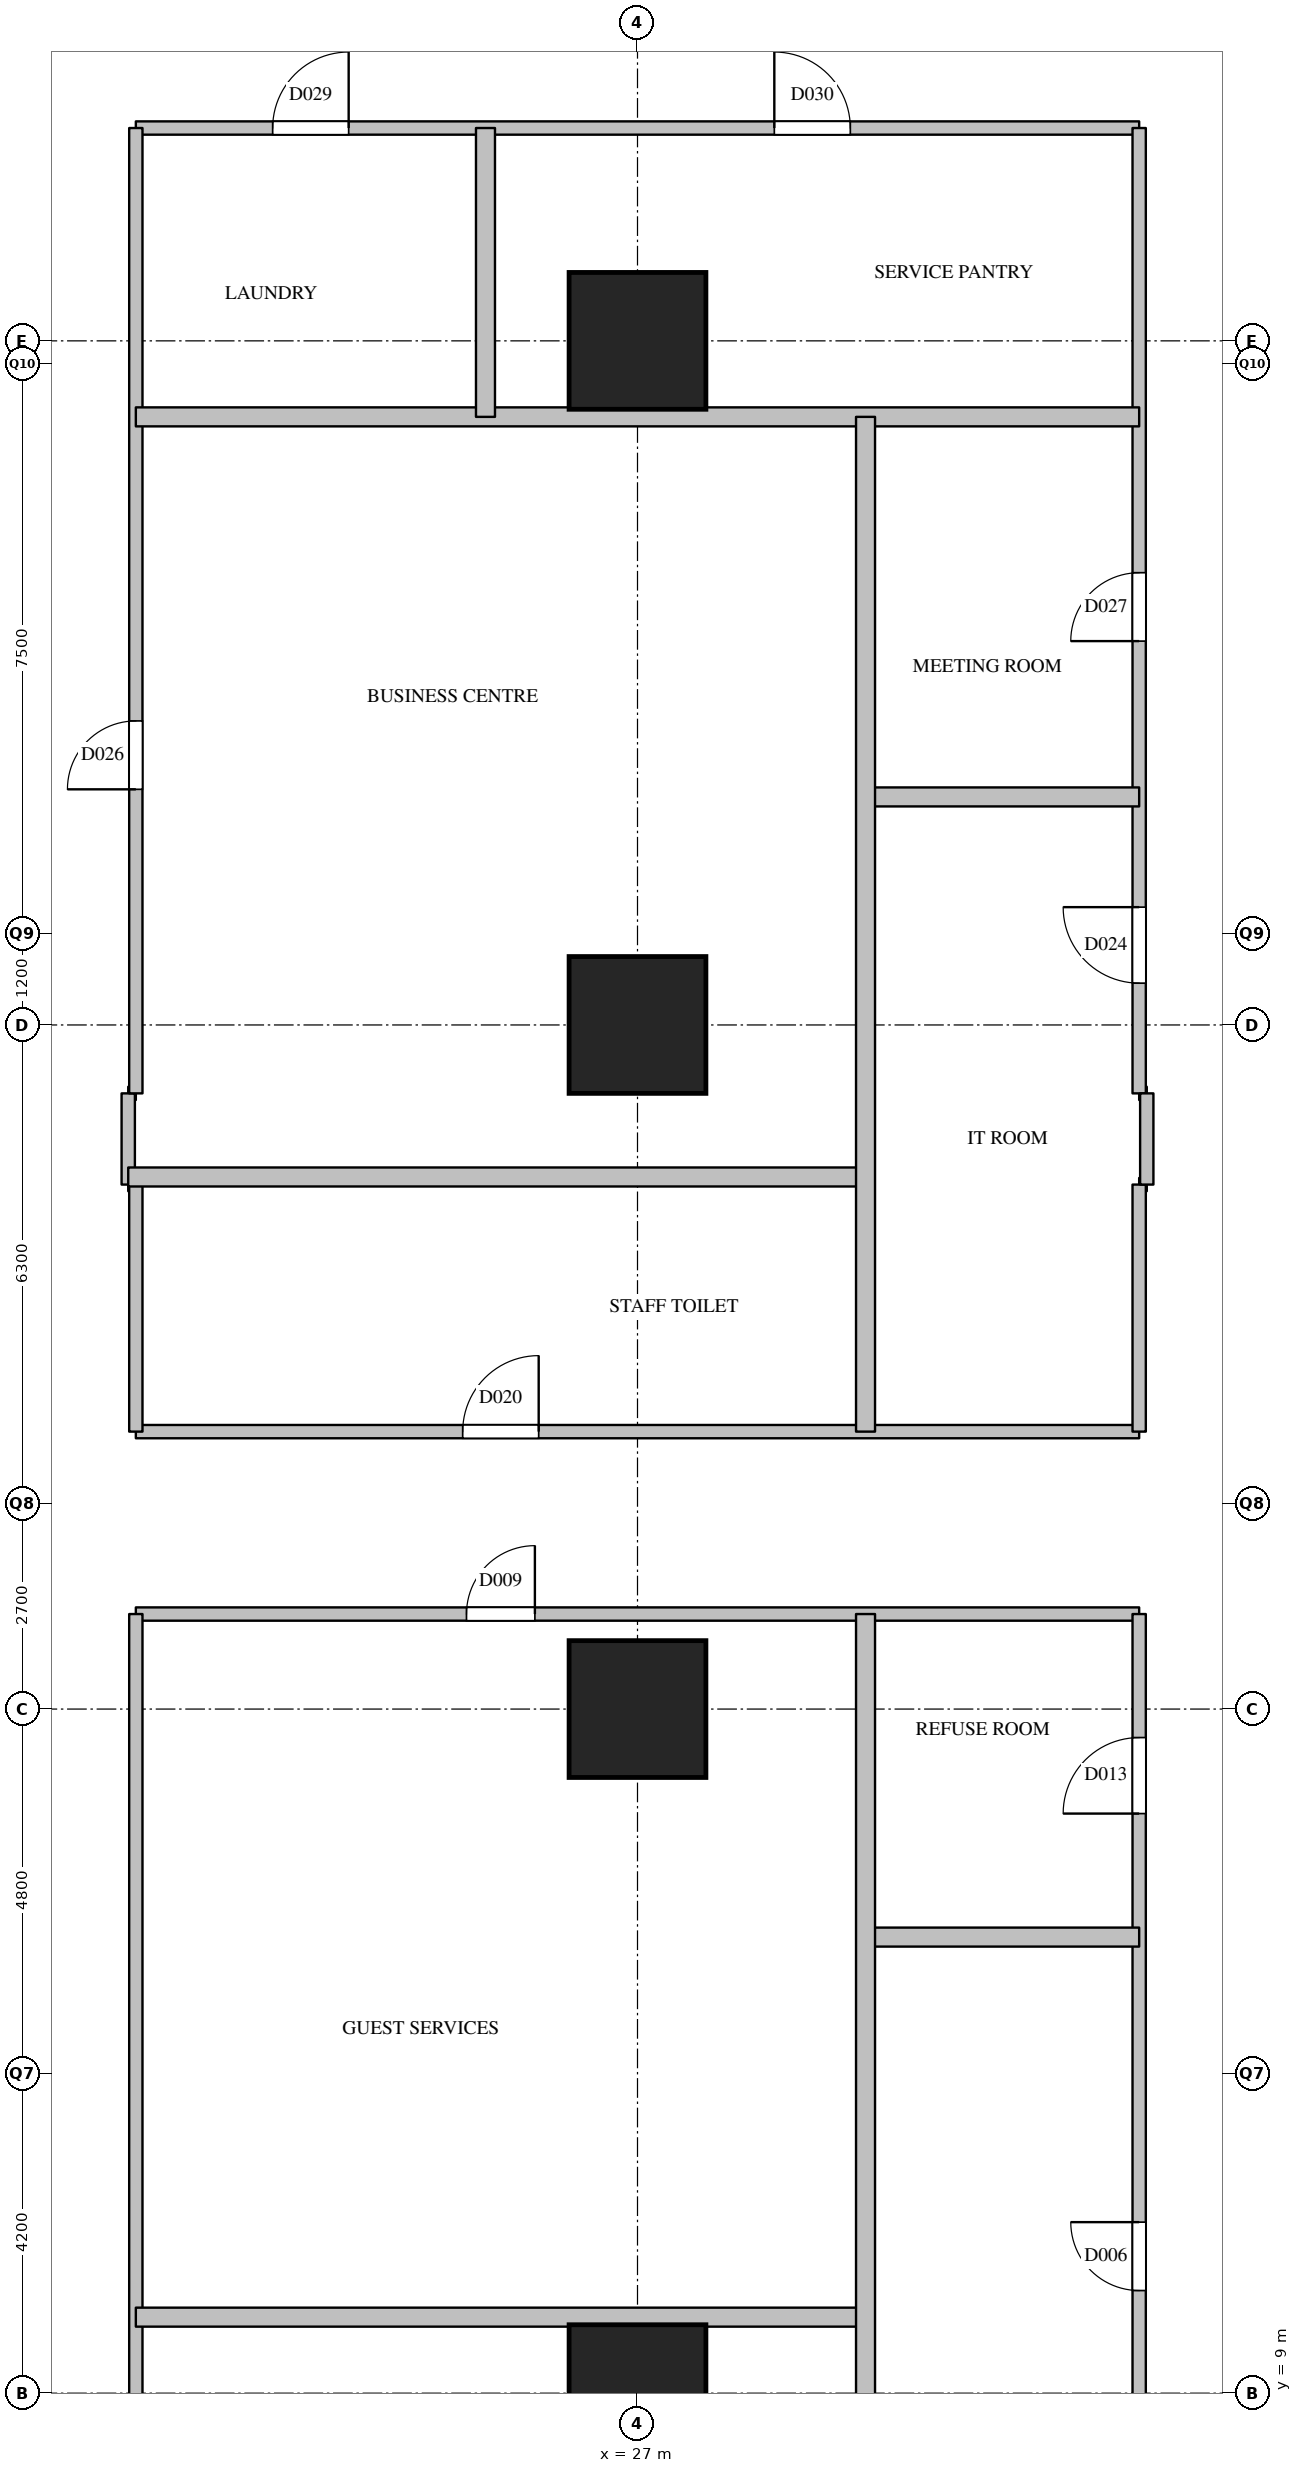
"""IFC4 building model, lengths in metres.
Left out: names, types, materials, properties, quantities, classifications, styles, units other than length and angle.
Written with IfcOpenShell. Run it as: python <this file> out.ifc"""

import sys

from ifc_helpers import new_model, si_unit, direction, frame, frame_2d, origin, origin_2d, place, context, subcontext, project, spatial, rectangle, extrude, element, fill, save


model = new_model("IFC4")
c1 = context("Model", 3, precision=1e-05, world=origin(), true_north=direction((0.0, 1.0)))
c2 = subcontext(c1, "Body", "Model", "MODEL_VIEW")
j1 = project(units=[si_unit("LENGTHUNIT", "METRE"), si_unit("PLANEANGLEUNIT", "RADIAN")], contexts=[c1])
p1 = place(None, origin())
s1 = spatial("IfcSite", under=j1, at=p1, CompositionType="ELEMENT")
p2 = place(p1, origin())
s2 = spatial("IfcBuilding", under=s1, at=p2, CompositionType="ELEMENT")
p3 = place(p2, frame((0.0, 0.0, 50.0)))
s3 = spatial("IfcBuildingStorey", under=s2, at=p3, CompositionType="ELEMENT", Elevation=50.0)
for number, where, z_axis, x_axis in (
    (1, (27.0, 9.0, 0.0), (0.0, 0.0, 1.0), (1.0, 0.0, 0.0)),
    (2, (27.0, 18.0, 0.0), (0.0, 0.0, 1.0), (1.0, 0.0, 0.0)),
    (3, (27.0, 27.0, 0.0), (0.0, 0.0, 1.0), (1.0, 0.0, 0.0)),
    (4, (27.0, 36.0, 0.0), (0.0, 0.0, 1.0), (1.0, 0.0, 0.0)),
):
    element("IfcColumn", number, at=place(p3, frame(where, z_axis=z_axis, x_axis=x_axis)), inside=s3, PredefinedType="COLUMN", context=c2, shape_type="SweptSolid", body=[
        extrude(rectangle(XDim=1.8, YDim=1.8, at=origin_2d()), origin(), (0.0, 0.0, 1.0), 3.8),
    ])
p4 = place(p3, frame((20.4, 19.25, 0.0), z_axis=(0.0, 0.0, 1.0), x_axis=(1.0, 0.0, 0.0)))
e5 = element("IfcWall", 5, at=p4, inside=s3, PredefinedType="PARTITIONING", context=c2, shape_type="SweptSolid", body=[
    extrude(rectangle(XDim=13.2, YDim=0.175, at=frame_2d((6.6, 0.0))), origin(), (0.0, 0.0, 1.0), 2.5),
])
p5 = place(p4, frame((4.35, 0.0, 0.0)))
e6 = element("IfcOpeningElement", 6, at=p5, cuts=e5, PredefinedType="OPENING", context=c2, shape_type="SweptSolid", body=[
    extrude(rectangle(XDim=0.9, YDim=2.1, at=frame_2d((0.45, 1.05))), frame((0.0, 0.097, 0.0), z_axis=(0.0, -1.0, 0.0), x_axis=(1.0, 0.0, 0.0)), (0.0, 0.0, 1.0), 0.195),
])
p6 = place(p3, frame((20.4, 21.65, 0.0), z_axis=(0.0, 0.0, 1.0), x_axis=(1.0, 0.0, 0.0)))
e7 = element("IfcWall", 7, at=p6, inside=s3, PredefinedType="PARTITIONING", context=c2, shape_type="SweptSolid", body=[
    extrude(rectangle(XDim=13.2, YDim=0.175, at=frame_2d((6.6, 0.0))), origin(), (0.0, 0.0, 1.0), 2.5),
])
p7 = place(p6, frame((4.3, 0.0, 0.0)))
e8 = element("IfcOpeningElement", 8, at=p7, cuts=e7, PredefinedType="OPENING", context=c2, shape_type="SweptSolid", body=[
    extrude(rectangle(XDim=1.0, YDim=2.1, at=frame_2d((0.5, 1.05))), frame((0.0, 0.097, 0.0), z_axis=(0.0, -1.0, 0.0), x_axis=(1.0, 0.0, 0.0)), (0.0, 0.0, 1.0), 0.195),
])
for number, where, z_axis, x_axis in (
    (9, (20.3, 24.9, 0.0), (0.0, 0.0, 1.0), (1.0, 0.0, 0.0)),
    (10, (33.6, 24.9, 0.0), (0.0, 0.0, 1.0), (1.0, 0.0, 0.0)),
    (11, (20.3, 26.1, 0.0), (0.0, 0.0, 1.0), (1.0, 0.0, 0.0)),
    (12, (33.6, 26.1, 0.0), (0.0, 0.0, 1.0), (1.0, 0.0, 0.0)),
):
    element("IfcWall", number, at=place(p3, frame(where, z_axis=z_axis, x_axis=x_axis)), inside=s3, PredefinedType="PARTITIONING", context=c2, shape_type="SweptSolid", body=[
        extrude(rectangle(XDim=0.1, YDim=0.175, at=frame_2d((0.05, 0.0))), origin(), (0.0, 0.0, 1.0), 3.5),
    ])
p8 = place(p3, frame((20.4, 38.8, 0.0), z_axis=(0.0, 0.0, 1.0), x_axis=(1.0, 0.0, 0.0)))
e13 = element("IfcWall", 13, at=p8, inside=s3, PredefinedType="PARTITIONING", context=c2, shape_type="SweptSolid", body=[
    extrude(rectangle(XDim=13.2, YDim=0.175, at=frame_2d((6.6, 0.0))), origin(), (0.0, 0.0, 1.0), 2.5),
])
p9 = place(p8, frame((1.8, 0.0, 0.0)))
e14 = element("IfcOpeningElement", 14, at=p9, cuts=e13, PredefinedType="OPENING", context=c2, shape_type="SweptSolid", body=[
    extrude(rectangle(XDim=1.0, YDim=2.1, at=frame_2d((0.5, 1.05))), frame((0.0, 0.097, 0.0), z_axis=(0.0, -1.0, 0.0), x_axis=(1.0, 0.0, 0.0)), (0.0, 0.0, 1.0), 0.195),
])
p10 = place(p8, frame((8.4, 0.0, 0.0)))
e15 = element("IfcOpeningElement", 15, at=p10, cuts=e13, PredefinedType="OPENING", context=c2, shape_type="SweptSolid", body=[
    extrude(rectangle(XDim=1.0, YDim=2.1, at=frame_2d((0.5, 1.05))), frame((0.0, 0.097, 0.0), z_axis=(0.0, -1.0, 0.0), x_axis=(1.0, 0.0, 0.0)), (0.0, 0.0, 1.0), 0.195),
])
p11 = place(p3, frame((20.3, 24.9, 0.0), z_axis=(0.0, 0.0, 1.0), x_axis=(0.0, 1.0, 0.0)))
e16 = element("IfcWall", 16, at=p11, inside=s3, PredefinedType="PARTITIONING", context=c2, shape_type="SweptSolid", body=[
    extrude(rectangle(XDim=1.2, YDim=0.175, at=frame_2d((0.6, 0.0))), origin(), (0.0, 0.0, 1.0), 3.5),
])
p12 = place(p3, frame((20.4, 6.6, 0.0), z_axis=(0.0, 0.0, 1.0), x_axis=(0.0, 1.0, 0.0)))
e17 = element("IfcWall", 17, at=p12, inside=s3, PredefinedType="PARTITIONING", context=c2, shape_type="SweptSolid", body=[
    extrude(rectangle(XDim=12.65, YDim=0.175, at=frame_2d((6.325, 0.0))), origin(), (0.0, 0.0, 1.0), 3.5),
])
p13 = place(p12, frame((1.25, 0.0, 0.0)))
e18 = element("IfcOpeningElement", 18, at=p13, cuts=e17, PredefinedType="OPENING", context=c2, shape_type="SweptSolid", body=[
    extrude(rectangle(XDim=0.9, YDim=2.1, at=frame_2d((0.45, 1.05))), frame((0.0, 0.097, 0.0), z_axis=(0.0, -1.0, 0.0), x_axis=(1.0, 0.0, 0.0)), (0.0, 0.0, 1.0), 0.195),
])
p14 = place(p3, frame((20.4, 21.65, 0.0), z_axis=(0.0, 0.0, 1.0), x_axis=(0.0, 1.0, 0.0)))
e19 = element("IfcWall", 19, at=p14, inside=s3, PredefinedType="PARTITIONING", context=c2, shape_type="SweptSolid", body=[
    extrude(rectangle(XDim=3.25, YDim=0.175, at=frame_2d((1.625, 0.0))), origin(), (0.0, 0.0, 1.0), 3.5),
])
p15 = place(p3, frame((20.4, 26.1, 0.0), z_axis=(0.0, 0.0, 1.0), x_axis=(0.0, 1.0, 0.0)))
e20 = element("IfcWall", 20, at=p15, inside=s3, PredefinedType="PARTITIONING", context=c2, shape_type="SweptSolid", body=[
    extrude(rectangle(XDim=12.7, YDim=0.175, at=frame_2d((6.35, 0.0))), origin(), (0.0, 0.0, 1.0), 2.5),
])
p16 = place(p15, frame((4.0, 0.0, 0.0)))
e21 = element("IfcOpeningElement", 21, at=p16, cuts=e20, PredefinedType="OPENING", context=c2, shape_type="SweptSolid", body=[
    extrude(rectangle(XDim=0.9, YDim=2.1, at=frame_2d((0.45, 1.05))), frame((0.0, 0.097, 0.0), z_axis=(0.0, -1.0, 0.0), x_axis=(1.0, 0.0, 0.0)), (0.0, 0.0, 1.0), 0.195),
])
p17 = place(p3, frame((33.6, 6.6, 0.0), z_axis=(0.0, 0.0, 1.0), x_axis=(0.0, 1.0, 0.0)))
e22 = element("IfcWall", 22, at=p17, inside=s3, PredefinedType="PARTITIONING", context=c2, shape_type="SweptSolid", body=[
    extrude(rectangle(XDim=12.65, YDim=0.175, at=frame_2d((6.325, 0.0))), origin(), (0.0, 0.0, 1.0), 3.5),
])
p18 = place(p17, frame((3.75, 0.0, 0.0)))
e23 = element("IfcOpeningElement", 23, at=p18, cuts=e22, PredefinedType="OPENING", context=c2, shape_type="SweptSolid", body=[
    extrude(rectangle(XDim=0.9, YDim=2.1, at=frame_2d((0.45, 1.05))), frame((0.0, 0.097, 0.0), z_axis=(0.0, -1.0, 0.0), x_axis=(1.0, 0.0, 0.0)), (0.0, 0.0, 1.0), 0.195),
])
p19 = place(p17, frame((10.025, 0.0, 0.0)))
e24 = element("IfcOpeningElement", 24, at=p19, cuts=e22, PredefinedType="OPENING", context=c2, shape_type="SweptSolid", body=[
    extrude(rectangle(XDim=1.0, YDim=2.1, at=frame_2d((0.5, 1.05))), frame((0.0, 0.097, 0.0), z_axis=(0.0, -1.0, 0.0), x_axis=(1.0, 0.0, 0.0)), (0.0, 0.0, 1.0), 0.195),
])
p20 = place(p3, frame((33.6, 21.65, 0.0), z_axis=(0.0, 0.0, 1.0), x_axis=(0.0, 1.0, 0.0)))
e25 = element("IfcWall", 25, at=p20, inside=s3, PredefinedType="PARTITIONING", context=c2, shape_type="SweptSolid", body=[
    extrude(rectangle(XDim=3.25, YDim=0.175, at=frame_2d((1.625, 0.0))), origin(), (0.0, 0.0, 1.0), 3.5),
])
p21 = place(p3, frame((33.6, 26.1, 0.0), z_axis=(0.0, 0.0, 1.0), x_axis=(0.0, 1.0, 0.0)))
e26 = element("IfcWall", 26, at=p21, inside=s3, PredefinedType="PARTITIONING", context=c2, shape_type="SweptSolid", body=[
    extrude(rectangle(XDim=12.7, YDim=0.175, at=frame_2d((6.35, 0.0))), origin(), (0.0, 0.0, 1.0), 2.5),
])
p22 = place(p21, frame((1.45, 0.0, 0.0)))
e27 = element("IfcOpeningElement", 27, at=p22, cuts=e26, PredefinedType="OPENING", context=c2, shape_type="SweptSolid", body=[
    extrude(rectangle(XDim=1.0, YDim=2.1, at=frame_2d((0.5, 1.05))), frame((0.0, 0.097, 0.0), z_axis=(0.0, -1.0, 0.0), x_axis=(1.0, 0.0, 0.0)), (0.0, 0.0, 1.0), 0.195),
])
p23 = place(p21, frame((5.95, 0.0, 0.0)))
e28 = element("IfcOpeningElement", 28, at=p23, cuts=e26, PredefinedType="OPENING", context=c2, shape_type="SweptSolid", body=[
    extrude(rectangle(XDim=0.9, YDim=2.1, at=frame_2d((0.45, 1.05))), frame((0.0, 0.097, 0.0), z_axis=(0.0, -1.0, 0.0), x_axis=(1.0, 0.0, 0.0)), (0.0, 0.0, 1.0), 0.195),
])
p24 = place(p3, frame((33.7, 24.9, 0.0), z_axis=(0.0, 0.0, 1.0), x_axis=(0.0, 1.0, 0.0)))
e29 = element("IfcWall", 29, at=p24, inside=s3, PredefinedType="PARTITIONING", context=c2, shape_type="SweptSolid", body=[
    extrude(rectangle(XDim=1.2, YDim=0.175, at=frame_2d((0.6, 0.0))), origin(), (0.0, 0.0, 1.0), 3.5),
])
p25 = place(p3, frame((20.4, 10.0, 0.0), z_axis=(0.0, 0.0, 1.0), x_axis=(1.0, 0.0, 0.0)))
e30 = element("IfcWall", 30, at=p25, inside=s3, PredefinedType="PARTITIONING", context=c2, shape_type="SweptSolid", body=[
    extrude(rectangle(XDim=9.6, YDim=0.25, at=frame_2d((4.8, 0.0))), origin(), (0.0, 0.0, 1.0), 2.5),
])
p26 = place(p3, frame((30.0, 15.0, 0.0), z_axis=(0.0, 0.0, 1.0), x_axis=(1.0, 0.0, 0.0)))
e31 = element("IfcWall", 31, at=p26, inside=s3, PredefinedType="PARTITIONING", context=c2, shape_type="SweptSolid", body=[
    extrude(rectangle(XDim=3.6, YDim=0.25, at=frame_2d((1.8, 0.0))), origin(), (0.0, 0.0, 1.0), 3.5),
])
p27 = place(p3, frame((20.3, 25.0, 0.0), z_axis=(0.0, 0.0, 1.0), x_axis=(1.0, 0.0, 0.0)))
e32 = element("IfcWall", 32, at=p27, inside=s3, PredefinedType="PARTITIONING", context=c2, shape_type="SweptSolid", body=[
    extrude(rectangle(XDim=9.7, YDim=0.25, at=frame_2d((4.85, 0.0))), origin(), (0.0, 0.0, 1.0), 2.5),
])
p28 = place(p3, frame((30.0, 30.0, 0.0), z_axis=(0.0, 0.0, 1.0), x_axis=(1.0, 0.0, 0.0)))
e33 = element("IfcWall", 33, at=p28, inside=s3, PredefinedType="PARTITIONING", context=c2, shape_type="SweptSolid", body=[
    extrude(rectangle(XDim=3.6, YDim=0.25, at=frame_2d((1.8, 0.0))), origin(), (0.0, 0.0, 1.0), 3.5),
])
p29 = place(p3, frame((20.4, 35.0, 0.0), z_axis=(0.0, 0.0, 1.0), x_axis=(1.0, 0.0, 0.0)))
e34 = element("IfcWall", 34, at=p29, inside=s3, PredefinedType="PARTITIONING", context=c2, shape_type="SweptSolid", body=[
    extrude(rectangle(XDim=13.2, YDim=0.25, at=frame_2d((6.6, 0.0))), origin(), (0.0, 0.0, 1.0), 2.5),
])
p30 = place(p3, frame((25.0, 35.0, 0.0), z_axis=(0.0, 0.0, 1.0), x_axis=(0.0, 1.0, 0.0)))
e35 = element("IfcWall", 35, at=p30, inside=s3, PredefinedType="PARTITIONING", context=c2, shape_type="SweptSolid", body=[
    extrude(rectangle(XDim=3.8, YDim=0.25, at=frame_2d((1.9, 0.0))), origin(), (0.0, 0.0, 1.0), 3.5),
])
p31 = place(p3, frame((30.0, 0.0, 0.0), z_axis=(0.0, 0.0, 1.0), x_axis=(0.0, 1.0, 0.0)))
e36 = element("IfcWall", 36, at=p31, inside=s3, PredefinedType="PARTITIONING", context=c2, shape_type="SweptSolid", body=[
    extrude(rectangle(XDim=19.25, YDim=0.25, at=frame_2d((9.625, 0.0))), origin(), (0.0, 0.0, 1.0), 2.5),
])
p32 = place(p3, frame((30.0, 21.65, 0.0), z_axis=(0.0, 0.0, 1.0), x_axis=(0.0, 1.0, 0.0)))
e37 = element("IfcWall", 37, at=p32, inside=s3, PredefinedType="PARTITIONING", context=c2, shape_type="SweptSolid", body=[
    extrude(rectangle(XDim=13.35, YDim=0.25, at=frame_2d((6.675, 0.0))), origin(), (0.0, 0.0, 1.0), 2.5),
])
p33 = place(p18, origin())
e38 = element("IfcDoor", 38, at=p33, inside=s3, OperationType="SINGLE_SWING_RIGHT", PredefinedType="DOOR", context=c2, shape_type="SweptSolid", body=[
    extrude(rectangle(XDim=0.9, YDim=2.1, at=frame_2d((0.45, 1.05))), frame((0.0, 0.025, 0.0), z_axis=(0.0, -1.0, 0.0), x_axis=(1.0, 0.0, 0.0)), (0.0, 0.0, 1.0), 0.05),
])
fill(e23, e38)
p34 = place(p5, origin())
e39 = element("IfcDoor", 39, at=p34, inside=s3, OperationType="SINGLE_SWING_RIGHT", PredefinedType="DOOR", context=c2, shape_type="SweptSolid", body=[
    extrude(rectangle(XDim=0.9, YDim=2.1, at=frame_2d((0.45, 1.05))), frame((0.0, 0.025, 0.0), z_axis=(0.0, -1.0, 0.0), x_axis=(1.0, 0.0, 0.0)), (0.0, 0.0, 1.0), 0.05),
])
fill(e6, e39)
p35 = place(p19, origin())
e40 = element("IfcDoor", 40, at=p35, inside=s3, OperationType="SINGLE_SWING_LEFT", PredefinedType="DOOR", context=c2, shape_type="SweptSolid", body=[
    extrude(rectangle(XDim=1.0, YDim=2.1, at=frame_2d((0.5, 1.05))), frame((0.0, 0.025, 0.0), z_axis=(0.0, -1.0, 0.0), x_axis=(1.0, 0.0, 0.0)), (0.0, 0.0, 1.0), 0.05),
])
fill(e24, e40)
p36 = place(p7, origin())
e41 = element("IfcDoor", 41, at=p36, inside=s3, OperationType="SINGLE_SWING_RIGHT", PredefinedType="DOOR", context=c2, shape_type="SweptSolid", body=[
    extrude(rectangle(XDim=1.0, YDim=2.1, at=frame_2d((0.5, 1.05))), frame((0.0, 0.025, 0.0), z_axis=(0.0, -1.0, 0.0), x_axis=(1.0, 0.0, 0.0)), (0.0, 0.0, 1.0), 0.05),
])
fill(e8, e41)
p37 = place(p22, origin())
e42 = element("IfcDoor", 42, at=p37, inside=s3, OperationType="SINGLE_SWING_RIGHT", PredefinedType="DOOR", context=c2, shape_type="SweptSolid", body=[
    extrude(rectangle(XDim=1.0, YDim=2.1, at=frame_2d((0.5, 1.05))), frame((0.0, 0.025, 0.0), z_axis=(0.0, -1.0, 0.0), x_axis=(1.0, 0.0, 0.0)), (0.0, 0.0, 1.0), 0.05),
])
fill(e27, e42)
p38 = place(p16, origin())
e43 = element("IfcDoor", 43, at=p38, inside=s3, OperationType="SINGLE_SWING_LEFT", PredefinedType="DOOR", context=c2, shape_type="SweptSolid", body=[
    extrude(rectangle(XDim=0.9, YDim=2.1, at=frame_2d((0.45, 1.05))), frame((0.0, 0.025, 0.0), z_axis=(0.0, -1.0, 0.0), x_axis=(1.0, 0.0, 0.0)), (0.0, 0.0, 1.0), 0.05),
])
fill(e21, e43)
p39 = place(p23, origin())
e44 = element("IfcDoor", 44, at=p39, inside=s3, OperationType="SINGLE_SWING_LEFT", PredefinedType="DOOR", context=c2, shape_type="SweptSolid", body=[
    extrude(rectangle(XDim=0.9, YDim=2.1, at=frame_2d((0.45, 1.05))), frame((0.0, 0.025, 0.0), z_axis=(0.0, -1.0, 0.0), x_axis=(1.0, 0.0, 0.0)), (0.0, 0.0, 1.0), 0.05),
])
fill(e28, e44)
p40 = place(p9, origin())
e45 = element("IfcDoor", 45, at=p40, inside=s3, OperationType="SINGLE_SWING_RIGHT", PredefinedType="DOOR", context=c2, shape_type="SweptSolid", body=[
    extrude(rectangle(XDim=1.0, YDim=2.1, at=frame_2d((0.5, 1.05))), frame((0.0, 0.025, 0.0), z_axis=(0.0, -1.0, 0.0), x_axis=(1.0, 0.0, 0.0)), (0.0, 0.0, 1.0), 0.05),
])
fill(e14, e45)
p41 = place(p10, origin())
e46 = element("IfcDoor", 46, at=p41, inside=s3, OperationType="SINGLE_SWING_LEFT", PredefinedType="DOOR", context=c2, shape_type="SweptSolid", body=[
    extrude(rectangle(XDim=1.0, YDim=2.1, at=frame_2d((0.5, 1.05))), frame((0.0, 0.025, 0.0), z_axis=(0.0, -1.0, 0.0), x_axis=(1.0, 0.0, 0.0)), (0.0, 0.0, 1.0), 0.05),
])
fill(e15, e46)
save(model, sys.argv[1])
